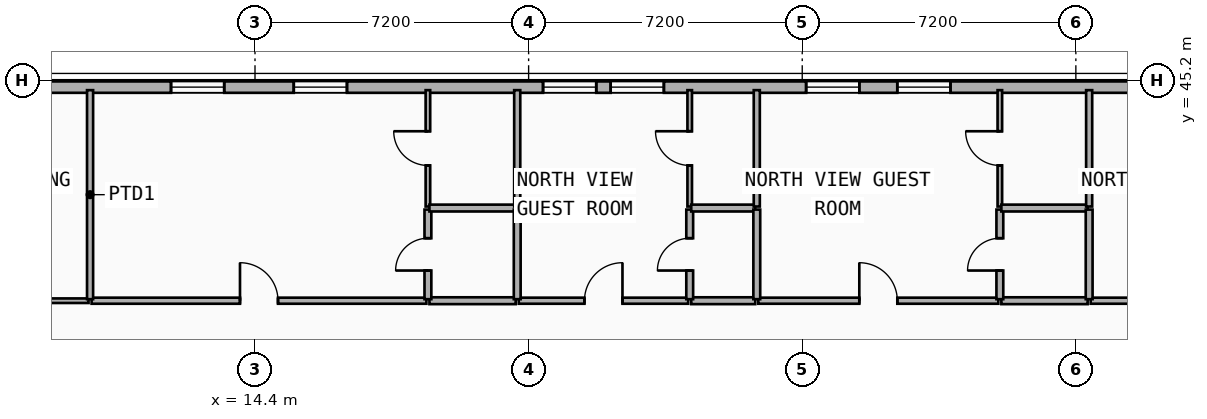
"""IFC4 building model, lengths in metres.
Left out: names, types, materials, properties, quantities, classifications, styles, units other than length and angle.
Written with IfcOpenShell. Run it as: python <this file> out.ifc"""

import sys

from ifc_helpers import new_model, si_unit, direction, frame, frame_2d, origin, place, context, subcontext, project, spatial, rectangle, extrude, element, fill, save


model = new_model("IFC4")
c1 = context("Model", 3, precision=1e-05, world=origin(), true_north=direction((0.0, 1.0)))
c2 = subcontext(c1, "Body", "Model", "MODEL_VIEW")
j1 = project(units=[si_unit("LENGTHUNIT", "METRE"), si_unit("PLANEANGLEUNIT", "RADIAN")], contexts=[c1])
p1 = place(None, origin())
s1 = spatial("IfcSite", under=j1, at=p1, CompositionType="ELEMENT")
p2 = place(p1, origin())
s2 = spatial("IfcBuilding", under=s1, at=p2, CompositionType="ELEMENT")
p3 = place(p2, frame((0.0, 0.0, 43.0)))
s3 = spatial("IfcBuildingStorey", under=s2, at=p3, CompositionType="ELEMENT", Elevation=43.0)
p4 = place(p3, frame((4.2, 45.02, 0.0), z_axis=(0.0, 0.0, 1.0), x_axis=(1.0, 0.0, 0.0)))
e1 = element("IfcWall", 1, at=p4, inside=s3, PredefinedType="SOLIDWALL", context=c2, shape_type="SweptSolid", body=[
    extrude(rectangle(XDim=49.2, YDim=0.3, at=frame_2d((24.6, 0.0))), origin(), (0.0, 0.0, 1.0), 3.24),
])
p5 = place(p4, frame((7.99, 0.0, 0.85)))
e2 = element("IfcOpeningElement", 2, at=p5, cuts=e1, PredefinedType="OPENING", context=c2, shape_type="SweptSolid", body=[
    extrude(rectangle(XDim=1.4, YDim=1.8, at=frame_2d((0.7, 0.9))), frame((0.0, 0.16, 0.0), z_axis=(0.0, -1.0, 0.0), x_axis=(1.0, 0.0, 0.0)), (0.0, 0.0, 1.0), 0.32),
])
p6 = place(p4, frame((11.22, 0.0, 0.85)))
e3 = element("IfcOpeningElement", 3, at=p6, cuts=e1, PredefinedType="OPENING", context=c2, shape_type="SweptSolid", body=[
    extrude(rectangle(XDim=1.4, YDim=1.8, at=frame_2d((0.7, 0.9))), frame((0.0, 0.16, 0.0), z_axis=(0.0, -1.0, 0.0), x_axis=(1.0, 0.0, 0.0)), (0.0, 0.0, 1.0), 0.32),
])
p7 = place(p4, frame((17.78, 0.0, 0.85)))
e4 = element("IfcOpeningElement", 4, at=p7, cuts=e1, PredefinedType="OPENING", context=c2, shape_type="SweptSolid", body=[
    extrude(rectangle(XDim=1.4, YDim=1.8, at=frame_2d((0.7, 0.9))), frame((0.0, 0.16, 0.0), z_axis=(0.0, -1.0, 0.0), x_axis=(1.0, 0.0, 0.0)), (0.0, 0.0, 1.0), 0.32),
])
p8 = place(p4, frame((19.559, 0.0, 0.85)))
e5 = element("IfcOpeningElement", 5, at=p8, cuts=e1, PredefinedType="OPENING", context=c2, shape_type="SweptSolid", body=[
    extrude(rectangle(XDim=1.4, YDim=1.8, at=frame_2d((0.7, 0.9))), frame((0.0, 0.16, 0.0), z_axis=(0.0, -1.0, 0.0), x_axis=(1.0, 0.0, 0.0)), (0.0, 0.0, 1.0), 0.32),
])
p9 = place(p4, frame((24.703, 0.0, 0.85)))
e6 = element("IfcOpeningElement", 6, at=p9, cuts=e1, PredefinedType="OPENING", context=c2, shape_type="SweptSolid", body=[
    extrude(rectangle(XDim=1.4, YDim=1.8, at=frame_2d((0.7, 0.9))), frame((0.0, 0.16, 0.0), z_axis=(0.0, -1.0, 0.0), x_axis=(1.0, 0.0, 0.0)), (0.0, 0.0, 1.0), 0.32),
])
p10 = place(p4, frame((27.101, 0.0, 0.85)))
e7 = element("IfcOpeningElement", 7, at=p10, cuts=e1, PredefinedType="OPENING", context=c2, shape_type="SweptSolid", body=[
    extrude(rectangle(XDim=1.4, YDim=1.8, at=frame_2d((0.7, 0.9))), frame((0.0, 0.16, 0.0), z_axis=(0.0, -1.0, 0.0), x_axis=(1.0, 0.0, 0.0)), (0.0, 0.0, 1.0), 0.32),
])
p11 = place(p4, frame((33.55, 0.0, 0.85)))
e8 = element("IfcOpeningElement", 8, at=p11, cuts=e1, PredefinedType="OPENING", context=c2, shape_type="SweptSolid", body=[
    extrude(rectangle(XDim=1.4, YDim=1.8, at=frame_2d((0.7, 0.9))), frame((0.0, 0.16, 0.0), z_axis=(0.0, -1.0, 0.0), x_axis=(1.0, 0.0, 0.0)), (0.0, 0.0, 1.0), 0.32),
])
p12 = place(p4, frame((36.05, 0.0, 0.85)))
e9 = element("IfcOpeningElement", 9, at=p12, cuts=e1, PredefinedType="OPENING", context=c2, shape_type="SweptSolid", body=[
    extrude(rectangle(XDim=1.4, YDim=1.8, at=frame_2d((0.7, 0.9))), frame((0.0, 0.16, 0.0), z_axis=(0.0, -1.0, 0.0), x_axis=(1.0, 0.0, 0.0)), (0.0, 0.0, 1.0), 0.32),
])
p13 = place(p4, frame((43.645, 0.0, 0.85)))
e10 = element("IfcOpeningElement", 10, at=p13, cuts=e1, PredefinedType="OPENING", context=c2, shape_type="SweptSolid", body=[
    extrude(rectangle(XDim=1.4, YDim=1.8, at=frame_2d((0.7, 0.9))), frame((0.0, 0.16, 0.0), z_axis=(0.0, -1.0, 0.0), x_axis=(1.0, 0.0, 0.0)), (0.0, 0.0, 1.0), 0.32),
])
p14 = place(p4, frame((45.424, 0.0, 0.85)))
e11 = element("IfcOpeningElement", 11, at=p14, cuts=e1, PredefinedType="OPENING", context=c2, shape_type="SweptSolid", body=[
    extrude(rectangle(XDim=1.4, YDim=1.8, at=frame_2d((0.7, 0.9))), frame((0.0, 0.16, 0.0), z_axis=(0.0, -1.0, 0.0), x_axis=(1.0, 0.0, 0.0)), (0.0, 0.0, 1.0), 0.32),
])
p15 = place(p3, frame((0.26, 39.4, 0.0), z_axis=(0.0, 0.0, 1.0), x_axis=(1.0, 0.0, 0.0)))
e12 = element("IfcWall", 12, at=p15, inside=s3, PredefinedType="PARTITIONING", context=c2, shape_type="SweptSolid", body=[
    extrude(rectangle(XDim=9.76, YDim=0.12, at=frame_2d((4.88, 0.0))), origin(), (0.0, 0.0, 1.0), 3.24),
])
p16 = place(p15, frame((4.43, 0.0, 0.0)))
e13 = element("IfcOpeningElement", 13, at=p16, cuts=e12, PredefinedType="OPENING", context=c2, shape_type="SweptSolid", body=[
    extrude(rectangle(XDim=0.9, YDim=2.1, at=frame_2d((0.45, 1.05))), frame((0.0, 0.07, 0.0), z_axis=(0.0, -1.0, 0.0), x_axis=(1.0, 0.0, 0.0)), (0.0, 0.0, 1.0), 0.14),
])
p17 = place(p3, frame((10.1, 39.4, 0.0), z_axis=(0.0, 0.0, 1.0), x_axis=(1.0, 0.0, 0.0)))
e14 = element("IfcWall", 14, at=p17, inside=s3, PredefinedType="PARTITIONING", context=c2, shape_type="SweptSolid", body=[
    extrude(rectangle(XDim=8.81, YDim=0.16, at=frame_2d((4.405, 0.0))), origin(), (0.0, 0.0, 1.0), 3.24),
])
p18 = place(p17, frame((3.905, 0.0, 0.0)))
e15 = element("IfcOpeningElement", 15, at=p18, cuts=e14, PredefinedType="OPENING", context=c2, shape_type="SweptSolid", body=[
    extrude(rectangle(XDim=1.0, YDim=2.15, at=frame_2d((0.5, 1.075))), frame((0.0, 0.09, 0.0), z_axis=(0.0, -1.0, 0.0), x_axis=(1.0, 0.0, 0.0)), (0.0, 0.0, 1.0), 0.18),
])
p19 = place(p3, frame((18.99, 39.4, 0.0), z_axis=(0.0, 0.0, 1.0), x_axis=(1.0, 0.0, 0.0)))
e16 = element("IfcWall", 16, at=p19, inside=s3, PredefinedType="PLUMBINGWALL", context=c2, shape_type="SweptSolid", body=[
    extrude(rectangle(XDim=2.27, YDim=0.18, at=frame_2d((1.135, 0.0))), origin(), (0.0, 0.0, 1.0), 3.24),
])
p20 = place(p3, frame((21.34, 39.4, 0.0), z_axis=(0.0, 0.0, 1.0), x_axis=(1.0, 0.0, 0.0)))
e17 = element("IfcWall", 17, at=p20, inside=s3, PredefinedType="PARTITIONING", context=c2, shape_type="SweptSolid", body=[
    extrude(rectangle(XDim=4.459, YDim=0.16, at=frame_2d((2.229, 0.0))), origin(), (0.0, 0.0, 1.0), 3.24),
])
p21 = place(p20, frame((1.729, 0.0, 0.0)))
e18 = element("IfcOpeningElement", 18, at=p21, cuts=e17, PredefinedType="OPENING", context=c2, shape_type="SweptSolid", body=[
    extrude(rectangle(XDim=1.0, YDim=2.15, at=frame_2d((0.5, 1.075))), frame((0.0, 0.09, 0.0), z_axis=(0.0, -1.0, 0.0), x_axis=(1.0, 0.0, 0.0)), (0.0, 0.0, 1.0), 0.18),
])
p22 = place(p3, frame((25.879, 39.4, 0.0), z_axis=(0.0, 0.0, 1.0), x_axis=(1.0, 0.0, 0.0)))
e19 = element("IfcWall", 19, at=p22, inside=s3, PredefinedType="PLUMBINGWALL", context=c2, shape_type="SweptSolid", body=[
    extrude(rectangle(XDim=1.685, YDim=0.18, at=frame_2d((0.843, 0.0))), origin(), (0.0, 0.0, 1.0), 3.24),
])
p23 = place(p3, frame((27.644, 39.4, 0.0), z_axis=(0.0, 0.0, 1.0), x_axis=(1.0, 0.0, 0.0)))
e20 = element("IfcWall", 20, at=p23, inside=s3, PredefinedType="PARTITIONING", context=c2, shape_type="SweptSolid", body=[
    extrude(rectangle(XDim=6.316, YDim=0.16, at=frame_2d((3.158, 0.0))), origin(), (0.0, 0.0, 1.0), 3.24),
])
p24 = place(p23, frame((2.658, 0.0, 0.0)))
e21 = element("IfcOpeningElement", 21, at=p24, cuts=e20, PredefinedType="OPENING", context=c2, shape_type="SweptSolid", body=[
    extrude(rectangle(XDim=1.0, YDim=2.15, at=frame_2d((0.5, 1.075))), frame((0.0, 0.09, 0.0), z_axis=(0.0, -1.0, 0.0), x_axis=(1.0, 0.0, 0.0)), (0.0, 0.0, 1.0), 0.18),
])
p25 = place(p3, frame((34.04, 39.4, 0.0), z_axis=(0.0, 0.0, 1.0), x_axis=(1.0, 0.0, 0.0)))
e22 = element("IfcWall", 22, at=p25, inside=s3, PredefinedType="PLUMBINGWALL", context=c2, shape_type="SweptSolid", body=[
    extrude(rectangle(XDim=2.27, YDim=0.18, at=frame_2d((1.135, 0.0))), origin(), (0.0, 0.0, 1.0), 3.24),
])
p26 = place(p3, frame((36.39, 39.4, 0.0), z_axis=(0.0, 0.0, 1.0), x_axis=(1.0, 0.0, 0.0)))
e23 = element("IfcWall", 23, at=p26, inside=s3, PredefinedType="PARTITIONING", context=c2, shape_type="SweptSolid", body=[
    extrude(rectangle(XDim=6.62, YDim=0.16, at=frame_2d((3.31, 0.0))), origin(), (0.0, 0.0, 1.0), 3.24),
])
p27 = place(p26, frame((2.81, 0.0, 0.0)))
e24 = element("IfcOpeningElement", 24, at=p27, cuts=e23, PredefinedType="OPENING", context=c2, shape_type="SweptSolid", body=[
    extrude(rectangle(XDim=1.0, YDim=2.15, at=frame_2d((0.5, 1.075))), frame((0.0, 0.09, 0.0), z_axis=(0.0, -1.0, 0.0), x_axis=(1.0, 0.0, 0.0)), (0.0, 0.0, 1.0), 0.18),
])
p28 = place(p3, frame((10.06, 39.44, 0.0), z_axis=(0.0, 0.0, 1.0), x_axis=(0.0, 1.0, 0.0)))
e25 = element("IfcWall", 25, at=p28, inside=s3, PredefinedType="PARTITIONING", context=c2, shape_type="SweptSolid", body=[
    extrude(rectangle(XDim=5.5, YDim=0.16, at=frame_2d((2.75, 0.0))), origin(), (0.0, 0.0, 1.0), 3.24),
])
p29 = place(p3, frame((18.95, 39.44, 0.0), z_axis=(0.0, 0.0, 1.0), x_axis=(0.0, 1.0, 0.0)))
e26 = element("IfcWall", 26, at=p29, inside=s3, PredefinedType="PLUMBINGWALL", context=c2, shape_type="SweptSolid", body=[
    extrude(rectangle(XDim=2.358, YDim=0.18, at=frame_2d((1.179, 0.0))), origin(), (0.0, 0.0, 1.0), 3.24),
])
p30 = place(p29, frame((0.754, 0.0, 0.0)))
e27 = element("IfcOpeningElement", 27, at=p30, cuts=e26, PredefinedType="OPENING", context=c2, shape_type="SweptSolid", body=[
    extrude(rectangle(XDim=0.85, YDim=2.1, at=frame_2d((0.425, 1.05))), frame((0.0, 0.1, 0.0), z_axis=(0.0, -1.0, 0.0), x_axis=(1.0, 0.0, 0.0)), (0.0, 0.0, 1.0), 0.2),
])
p31 = place(p3, frame((18.95, 41.878, 0.0), z_axis=(0.0, 0.0, 1.0), x_axis=(0.0, 1.0, 0.0)))
e28 = element("IfcWall", 28, at=p31, inside=s3, PredefinedType="PARTITIONING", context=c2, shape_type="SweptSolid", body=[
    extrude(rectangle(XDim=3.062, YDim=0.12, at=frame_2d((1.531, 0.0))), origin(), (0.0, 0.0, 1.0), 3.24),
])
p32 = place(p31, frame((1.081, 0.0, 0.0)))
e29 = element("IfcOpeningElement", 29, at=p32, cuts=e28, PredefinedType="OPENING", context=c2, shape_type="SweptSolid", body=[
    extrude(rectangle(XDim=0.9, YDim=2.1, at=frame_2d((0.45, 1.05))), frame((0.0, 0.07, 0.0), z_axis=(0.0, -1.0, 0.0), x_axis=(1.0, 0.0, 0.0)), (0.0, 0.0, 1.0), 0.14),
])
p33 = place(p3, frame((18.99, 41.838, 0.0), z_axis=(0.0, 0.0, 1.0), x_axis=(1.0, 0.0, 0.0)))
e30 = element("IfcWall", 30, at=p33, inside=s3, PredefinedType="PLUMBINGWALL", context=c2, shape_type="SweptSolid", body=[
    extrude(rectangle(XDim=2.27, YDim=0.18, at=frame_2d((1.135, 0.0))), origin(), (0.0, 0.0, 1.0), 3.24),
])
p34 = place(p3, frame((21.3, 39.44, 0.0), z_axis=(0.0, 0.0, 1.0), x_axis=(0.0, 1.0, 0.0)))
e31 = element("IfcWall", 31, at=p34, inside=s3, PredefinedType="PLUMBINGWALL", context=c2, shape_type="SweptSolid", body=[
    extrude(rectangle(XDim=2.358, YDim=0.18, at=frame_2d((1.179, 0.0))), origin(), (0.0, 0.0, 1.0), 3.24),
])
p35 = place(p3, frame((21.3, 41.878, 0.0), z_axis=(0.0, 0.0, 1.0), x_axis=(0.0, 1.0, 0.0)))
e32 = element("IfcWall", 32, at=p35, inside=s3, PredefinedType="PARTITIONING", context=c2, shape_type="SweptSolid", body=[
    extrude(rectangle(XDim=3.062, YDim=0.16, at=frame_2d((1.531, 0.0))), origin(), (0.0, 0.0, 1.0), 3.24),
])
p36 = place(p3, frame((25.839, 39.44, 0.0), z_axis=(0.0, 0.0, 1.0), x_axis=(0.0, 1.0, 0.0)))
e33 = element("IfcWall", 33, at=p36, inside=s3, PredefinedType="PLUMBINGWALL", context=c2, shape_type="SweptSolid", body=[
    extrude(rectangle(XDim=2.358, YDim=0.18, at=frame_2d((1.179, 0.0))), origin(), (0.0, 0.0, 1.0), 3.24),
])
p37 = place(p36, frame((0.754, 0.0, 0.0)))
e34 = element("IfcOpeningElement", 34, at=p37, cuts=e33, PredefinedType="OPENING", context=c2, shape_type="SweptSolid", body=[
    extrude(rectangle(XDim=0.85, YDim=2.1, at=frame_2d((0.425, 1.05))), frame((0.0, 0.1, 0.0), z_axis=(0.0, -1.0, 0.0), x_axis=(1.0, 0.0, 0.0)), (0.0, 0.0, 1.0), 0.2),
])
p38 = place(p3, frame((25.839, 41.878, 0.0), z_axis=(0.0, 0.0, 1.0), x_axis=(0.0, 1.0, 0.0)))
e35 = element("IfcWall", 35, at=p38, inside=s3, PredefinedType="PARTITIONING", context=c2, shape_type="SweptSolid", body=[
    extrude(rectangle(XDim=3.062, YDim=0.12, at=frame_2d((1.531, 0.0))), origin(), (0.0, 0.0, 1.0), 3.24),
])
p39 = place(p38, frame((1.081, 0.0, 0.0)))
e36 = element("IfcOpeningElement", 36, at=p39, cuts=e35, PredefinedType="OPENING", context=c2, shape_type="SweptSolid", body=[
    extrude(rectangle(XDim=0.9, YDim=2.1, at=frame_2d((0.45, 1.05))), frame((0.0, 0.07, 0.0), z_axis=(0.0, -1.0, 0.0), x_axis=(1.0, 0.0, 0.0)), (0.0, 0.0, 1.0), 0.14),
])
p40 = place(p3, frame((25.879, 41.838, 0.0), z_axis=(0.0, 0.0, 1.0), x_axis=(1.0, 0.0, 0.0)))
e37 = element("IfcWall", 37, at=p40, inside=s3, PredefinedType="PLUMBINGWALL", context=c2, shape_type="SweptSolid", body=[
    extrude(rectangle(XDim=1.685, YDim=0.18, at=frame_2d((0.843, 0.0))), origin(), (0.0, 0.0, 1.0), 3.24),
])
p41 = place(p3, frame((27.604, 39.44, 0.0), z_axis=(0.0, 0.0, 1.0), x_axis=(0.0, 1.0, 0.0)))
e38 = element("IfcWall", 38, at=p41, inside=s3, PredefinedType="PLUMBINGWALL", context=c2, shape_type="SweptSolid", body=[
    extrude(rectangle(XDim=2.358, YDim=0.18, at=frame_2d((1.179, 0.0))), origin(), (0.0, 0.0, 1.0), 3.24),
])
p42 = place(p3, frame((27.604, 41.878, 0.0), z_axis=(0.0, 0.0, 1.0), x_axis=(0.0, 1.0, 0.0)))
e39 = element("IfcWall", 39, at=p42, inside=s3, PredefinedType="PARTITIONING", context=c2, shape_type="SweptSolid", body=[
    extrude(rectangle(XDim=3.062, YDim=0.16, at=frame_2d((1.531, 0.0))), origin(), (0.0, 0.0, 1.0), 3.24),
])
p43 = place(p3, frame((34.0, 39.44, 0.0), z_axis=(0.0, 0.0, 1.0), x_axis=(0.0, 1.0, 0.0)))
e40 = element("IfcWall", 40, at=p43, inside=s3, PredefinedType="PLUMBINGWALL", context=c2, shape_type="SweptSolid", body=[
    extrude(rectangle(XDim=2.358, YDim=0.18, at=frame_2d((1.179, 0.0))), origin(), (0.0, 0.0, 1.0), 3.24),
])
p44 = place(p43, frame((0.754, 0.0, 0.0)))
e41 = element("IfcOpeningElement", 41, at=p44, cuts=e40, PredefinedType="OPENING", context=c2, shape_type="SweptSolid", body=[
    extrude(rectangle(XDim=0.85, YDim=2.1, at=frame_2d((0.425, 1.05))), frame((0.0, 0.1, 0.0), z_axis=(0.0, -1.0, 0.0), x_axis=(1.0, 0.0, 0.0)), (0.0, 0.0, 1.0), 0.2),
])
p45 = place(p3, frame((34.0, 41.878, 0.0), z_axis=(0.0, 0.0, 1.0), x_axis=(0.0, 1.0, 0.0)))
e42 = element("IfcWall", 42, at=p45, inside=s3, PredefinedType="PARTITIONING", context=c2, shape_type="SweptSolid", body=[
    extrude(rectangle(XDim=3.062, YDim=0.12, at=frame_2d((1.531, 0.0))), origin(), (0.0, 0.0, 1.0), 3.24),
])
p46 = place(p45, frame((1.081, 0.0, 0.0)))
e43 = element("IfcOpeningElement", 43, at=p46, cuts=e42, PredefinedType="OPENING", context=c2, shape_type="SweptSolid", body=[
    extrude(rectangle(XDim=0.9, YDim=2.1, at=frame_2d((0.45, 1.05))), frame((0.0, 0.07, 0.0), z_axis=(0.0, -1.0, 0.0), x_axis=(1.0, 0.0, 0.0)), (0.0, 0.0, 1.0), 0.14),
])
p47 = place(p3, frame((34.04, 41.838, 0.0), z_axis=(0.0, 0.0, 1.0), x_axis=(1.0, 0.0, 0.0)))
e44 = element("IfcWall", 44, at=p47, inside=s3, PredefinedType="PLUMBINGWALL", context=c2, shape_type="SweptSolid", body=[
    extrude(rectangle(XDim=2.27, YDim=0.18, at=frame_2d((1.135, 0.0))), origin(), (0.0, 0.0, 1.0), 3.24),
])
p48 = place(p3, frame((36.35, 39.44, 0.0), z_axis=(0.0, 0.0, 1.0), x_axis=(0.0, 1.0, 0.0)))
e45 = element("IfcWall", 45, at=p48, inside=s3, PredefinedType="PLUMBINGWALL", context=c2, shape_type="SweptSolid", body=[
    extrude(rectangle(XDim=2.358, YDim=0.18, at=frame_2d((1.179, 0.0))), origin(), (0.0, 0.0, 1.0), 3.24),
])
p49 = place(p3, frame((36.35, 41.878, 0.0), z_axis=(0.0, 0.0, 1.0), x_axis=(0.0, 1.0, 0.0)))
e46 = element("IfcWall", 46, at=p49, inside=s3, PredefinedType="PARTITIONING", context=c2, shape_type="SweptSolid", body=[
    extrude(rectangle(XDim=3.062, YDim=0.16, at=frame_2d((1.531, 0.0))), origin(), (0.0, 0.0, 1.0), 3.24),
])
p50 = place(p5, origin())
e47 = element("IfcWindow", 47, at=p50, inside=s3, PartitioningType="SINGLE_PANEL", PredefinedType="WINDOW", context=c2, shape_type="SweptSolid", body=[
    extrude(rectangle(XDim=1.4, YDim=1.8, at=frame_2d((0.7, 0.9))), frame((0.0, 0.03, 0.0), z_axis=(0.0, -1.0, 0.0), x_axis=(1.0, 0.0, 0.0)), (0.0, 0.0, 1.0), 0.06),
])
fill(e2, e47)
p51 = place(p6, origin())
e48 = element("IfcWindow", 48, at=p51, inside=s3, PartitioningType="SINGLE_PANEL", PredefinedType="WINDOW", context=c2, shape_type="SweptSolid", body=[
    extrude(rectangle(XDim=1.4, YDim=1.8, at=frame_2d((0.7, 0.9))), frame((0.0, 0.03, 0.0), z_axis=(0.0, -1.0, 0.0), x_axis=(1.0, 0.0, 0.0)), (0.0, 0.0, 1.0), 0.06),
])
fill(e3, e48)
p52 = place(p7, origin())
e49 = element("IfcWindow", 49, at=p52, inside=s3, PartitioningType="SINGLE_PANEL", PredefinedType="WINDOW", context=c2, shape_type="SweptSolid", body=[
    extrude(rectangle(XDim=1.4, YDim=1.8, at=frame_2d((0.7, 0.9))), frame((0.0, 0.03, 0.0), z_axis=(0.0, -1.0, 0.0), x_axis=(1.0, 0.0, 0.0)), (0.0, 0.0, 1.0), 0.06),
])
fill(e4, e49)
p53 = place(p8, origin())
e50 = element("IfcWindow", 50, at=p53, inside=s3, PartitioningType="SINGLE_PANEL", PredefinedType="WINDOW", context=c2, shape_type="SweptSolid", body=[
    extrude(rectangle(XDim=1.4, YDim=1.8, at=frame_2d((0.7, 0.9))), frame((0.0, 0.03, 0.0), z_axis=(0.0, -1.0, 0.0), x_axis=(1.0, 0.0, 0.0)), (0.0, 0.0, 1.0), 0.06),
])
fill(e5, e50)
p54 = place(p9, origin())
e51 = element("IfcWindow", 51, at=p54, inside=s3, PartitioningType="SINGLE_PANEL", PredefinedType="WINDOW", context=c2, shape_type="SweptSolid", body=[
    extrude(rectangle(XDim=1.4, YDim=1.8, at=frame_2d((0.7, 0.9))), frame((0.0, 0.03, 0.0), z_axis=(0.0, -1.0, 0.0), x_axis=(1.0, 0.0, 0.0)), (0.0, 0.0, 1.0), 0.06),
])
fill(e6, e51)
p55 = place(p10, origin())
e52 = element("IfcWindow", 52, at=p55, inside=s3, PartitioningType="SINGLE_PANEL", PredefinedType="WINDOW", context=c2, shape_type="SweptSolid", body=[
    extrude(rectangle(XDim=1.4, YDim=1.8, at=frame_2d((0.7, 0.9))), frame((0.0, 0.03, 0.0), z_axis=(0.0, -1.0, 0.0), x_axis=(1.0, 0.0, 0.0)), (0.0, 0.0, 1.0), 0.06),
])
fill(e7, e52)
p56 = place(p18, origin())
e53 = element("IfcDoor", 53, at=p56, inside=s3, OperationType="SINGLE_SWING_LEFT", PredefinedType="DOOR", context=c2, shape_type="SweptSolid", body=[
    extrude(rectangle(XDim=1.0, YDim=2.15, at=frame_2d((0.5, 1.075))), frame((0.0, 0.025, 0.0), z_axis=(0.0, -1.0, 0.0), x_axis=(1.0, 0.0, 0.0)), (0.0, 0.0, 1.0), 0.05),
])
fill(e15, e53)
p57 = place(p21, origin())
e54 = element("IfcDoor", 54, at=p57, inside=s3, OperationType="SINGLE_SWING_RIGHT", PredefinedType="DOOR", context=c2, shape_type="SweptSolid", body=[
    extrude(rectangle(XDim=1.0, YDim=2.15, at=frame_2d((0.5, 1.075))), frame((0.0, 0.025, 0.0), z_axis=(0.0, -1.0, 0.0), x_axis=(1.0, 0.0, 0.0)), (0.0, 0.0, 1.0), 0.05),
])
fill(e18, e54)
p58 = place(p24, origin())
e55 = element("IfcDoor", 55, at=p58, inside=s3, OperationType="SINGLE_SWING_LEFT", PredefinedType="DOOR", context=c2, shape_type="SweptSolid", body=[
    extrude(rectangle(XDim=1.0, YDim=2.15, at=frame_2d((0.5, 1.075))), frame((0.0, 0.025, 0.0), z_axis=(0.0, -1.0, 0.0), x_axis=(1.0, 0.0, 0.0)), (0.0, 0.0, 1.0), 0.05),
])
fill(e21, e55)
p59 = place(p30, origin())
e56 = element("IfcDoor", 56, at=p59, inside=s3, OperationType="SINGLE_SWING_LEFT", PredefinedType="DOOR", context=c2, shape_type="SweptSolid", body=[
    extrude(rectangle(XDim=0.85, YDim=2.1, at=frame_2d((0.425, 1.05))), frame((0.0, 0.025, 0.0), z_axis=(0.0, -1.0, 0.0), x_axis=(1.0, 0.0, 0.0)), (0.0, 0.0, 1.0), 0.05),
])
fill(e27, e56)
p60 = place(p32, origin())
e57 = element("IfcDoor", 57, at=p60, inside=s3, OperationType="SINGLE_SWING_RIGHT", PredefinedType="DOOR", context=c2, shape_type="SweptSolid", body=[
    extrude(rectangle(XDim=0.9, YDim=2.1, at=frame_2d((0.45, 1.05))), frame((0.0, 0.025, 0.0), z_axis=(0.0, -1.0, 0.0), x_axis=(1.0, 0.0, 0.0)), (0.0, 0.0, 1.0), 0.05),
])
fill(e29, e57)
p61 = place(p37, origin())
e58 = element("IfcDoor", 58, at=p61, inside=s3, OperationType="SINGLE_SWING_LEFT", PredefinedType="DOOR", context=c2, shape_type="SweptSolid", body=[
    extrude(rectangle(XDim=0.85, YDim=2.1, at=frame_2d((0.425, 1.05))), frame((0.0, 0.025, 0.0), z_axis=(0.0, -1.0, 0.0), x_axis=(1.0, 0.0, 0.0)), (0.0, 0.0, 1.0), 0.05),
])
fill(e34, e58)
p62 = place(p39, origin())
e59 = element("IfcDoor", 59, at=p62, inside=s3, OperationType="SINGLE_SWING_RIGHT", PredefinedType="DOOR", context=c2, shape_type="SweptSolid", body=[
    extrude(rectangle(XDim=0.9, YDim=2.1, at=frame_2d((0.45, 1.05))), frame((0.0, 0.025, 0.0), z_axis=(0.0, -1.0, 0.0), x_axis=(1.0, 0.0, 0.0)), (0.0, 0.0, 1.0), 0.05),
])
fill(e36, e59)
p63 = place(p44, origin())
e60 = element("IfcDoor", 60, at=p63, inside=s3, OperationType="SINGLE_SWING_LEFT", PredefinedType="DOOR", context=c2, shape_type="SweptSolid", body=[
    extrude(rectangle(XDim=0.85, YDim=2.1, at=frame_2d((0.425, 1.05))), frame((0.0, 0.025, 0.0), z_axis=(0.0, -1.0, 0.0), x_axis=(1.0, 0.0, 0.0)), (0.0, 0.0, 1.0), 0.05),
])
fill(e41, e60)
p64 = place(p46, origin())
e61 = element("IfcDoor", 61, at=p64, inside=s3, OperationType="SINGLE_SWING_RIGHT", PredefinedType="DOOR", context=c2, shape_type="SweptSolid", body=[
    extrude(rectangle(XDim=0.9, YDim=2.1, at=frame_2d((0.45, 1.05))), frame((0.0, 0.025, 0.0), z_axis=(0.0, -1.0, 0.0), x_axis=(1.0, 0.0, 0.0)), (0.0, 0.0, 1.0), 0.05),
])
fill(e43, e61)
save(model, sys.argv[1])
